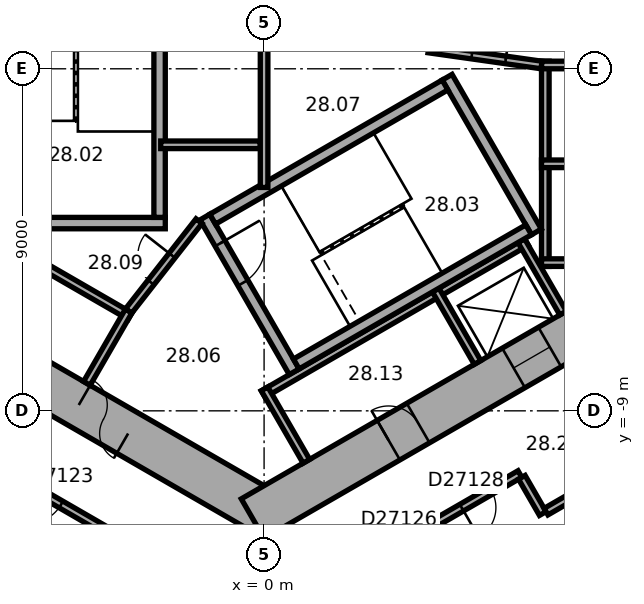
"""IFC4 building model, lengths in metres.
Left out: names, types, materials, properties, quantities, classifications, styles, units other than length and angle.
Written with IfcOpenShell. Run it as: python <this file> out.ifc"""

import sys

from ifc_helpers import new_model, si_unit, direction, frame, frame_2d, origin, place, context, subcontext, project, spatial, rectangle, extrude, element, fill, save


model = new_model("IFC4")
c1 = context("Model", 3, precision=1e-05, world=origin(), true_north=direction((0.0, 1.0)))
c2 = subcontext(c1, "Body", "Model", "MODEL_VIEW")
j1 = project(units=[si_unit("LENGTHUNIT", "METRE"), si_unit("PLANEANGLEUNIT", "RADIAN")], contexts=[c1])
p1 = place(None, origin())
s1 = spatial("IfcSite", under=j1, at=p1, CompositionType="ELEMENT")
p2 = place(p1, origin())
s2 = spatial("IfcBuilding", under=s1, at=p2, CompositionType="ELEMENT")
p3 = place(p2, frame((0.0, 0.0, 116.6)))
s3 = spatial("IfcBuildingStorey", under=s2, at=p3, CompositionType="ELEMENT", Elevation=116.6)
p4 = place(p3, frame((-10.4, -5.658, 0.0), z_axis=(0.0, 0.0, 1.0), x_axis=(0.866021384402, -0.500006961711, 0.0)))
e1 = element("IfcWall", 1, at=p4, inside=s3, PredefinedType="SHEAR", context=c2, shape_type="SweptSolid", body=[
    extrude(rectangle(XDim=12.355, YDim=1.2, at=frame_2d((6.178, 0.0))), origin(), (0.0, 0.0, 1.0), 3.3),
])
p5 = place(p4, frame((6.378, 0.0, 0.0)))
e2 = element("IfcOpeningElement", 2, at=p5, cuts=e1, PredefinedType="OPENING", context=c2, shape_type="SweptSolid", body=[
    extrude(rectangle(XDim=1.5, YDim=2.1, at=frame_2d((0.75, 1.05))), frame((0.0, 0.61, 0.0), z_axis=(0.0, -1.0, 0.0), x_axis=(1.0, 0.0, 0.0)), (0.0, 0.0, 1.0), 1.22),
])
p6 = place(p4, frame((3.228, 0.0, 0.0)))
e3 = element("IfcOpeningElement", 3, at=p6, cuts=e1, PredefinedType="OPENING", context=c2, shape_type="SweptSolid", body=[
    extrude(rectangle(XDim=0.9, YDim=2.1, at=frame_2d((0.45, 1.05))), frame((0.0, 0.61, 0.0), z_axis=(0.0, -1.0, 0.0), x_axis=(1.0, 0.0, 0.0)), (0.0, 0.0, 1.0), 1.22),
])
p7 = place(p3, frame((-0.3, -11.836, 0.0), z_axis=(0.0, 0.0, 1.0), x_axis=(0.866021384402, 0.500006961711, 0.0)))
e4 = element("IfcWall", 4, at=p7, inside=s3, PredefinedType="SHEAR", context=c2, shape_type="SweptSolid", body=[
    extrude(rectangle(XDim=12.355, YDim=1.2, at=frame_2d((6.178, 0.0))), origin(), (0.0, 0.0, 1.0), 3.3),
])
p8 = place(p7, frame((4.128, 0.0, 0.0)))
e5 = element("IfcOpeningElement", 5, at=p8, cuts=e4, PredefinedType="OPENING", context=c2, shape_type="SweptSolid", body=[
    extrude(rectangle(XDim=0.9, YDim=2.1, at=frame_2d((0.45, 1.05))), frame((0.0, 0.61, 0.0), z_axis=(0.0, -1.0, 0.0), x_axis=(1.0, 0.0, 0.0)), (0.0, 0.0, 1.0), 1.22),
])
p9 = place(p7, frame((7.928, 0.0, 0.0)))
e6 = element("IfcOpeningElement", 6, at=p9, cuts=e4, PredefinedType="OPENING", context=c2, shape_type="SweptSolid", body=[
    extrude(rectangle(XDim=1.1, YDim=2.1, at=frame_2d((0.55, 1.05))), frame((0.0, 0.61, 0.0), z_axis=(0.0, -1.0, 0.0), x_axis=(1.0, 0.0, 0.0)), (0.0, 0.0, 1.0), 1.22),
])
p10 = place(p3, frame((7.4, -5.2, 0.0), z_axis=(0.0, 0.0, 1.0), x_axis=(0.0, 1.0, 0.0)))
e7 = element("IfcWall", 7, at=p10, inside=s3, PredefinedType="PARTITIONING", context=c2, shape_type="SweptSolid", body=[
    extrude(rectangle(XDim=5.4, YDim=0.2, at=frame_2d((2.7, 0.0))), origin(), (0.0, 0.0, 1.0), 2.95),
])
for number, where, z_axis, x_axis in (
    (8, (7.3, -5.1, 0.0), (0.0, 0.0, 1.0), (1.0, 0.0, 0.0)),
    (9, (7.3, -2.5, 0.0), (0.0, 0.0, 1.0), (1.0, 0.0, 0.0)),
    (10, (7.3, 0.1, 0.0), (0.0, 0.0, 1.0), (1.0, 0.0, 0.0)),
):
    element("IfcWall", number, at=place(p3, frame(where, z_axis=z_axis, x_axis=x_axis)), inside=s3, PredefinedType="PARTITIONING", context=c2, shape_type="SweptSolid", body=[
        extrude(rectangle(XDim=2.2, YDim=0.2, at=frame_2d((1.1, 0.0))), origin(), (0.0, 0.0, 1.0), 2.95),
    ])
p11 = place(p3, frame((-8.203, -3.809, 0.0), z_axis=(0.0, 0.0, 1.0), x_axis=(0.866028230842, -0.499995103361, 0.0)))
e11 = element("IfcWall", 11, at=p11, inside=s3, PredefinedType="PARTITIONING", context=c2, shape_type="SweptSolid", body=[
    extrude(rectangle(XDim=5.4, YDim=0.2, at=frame_2d((2.7, 0.0))), origin(), (0.0, 0.0, 1.0), 2.95),
])
p12 = place(p3, frame((-3.563, -6.372, 0.0), z_axis=(0.0, 0.0, 1.0), x_axis=(-0.499994660107, -0.866028486751, 0.0)))
e12 = element("IfcWall", 12, at=p12, inside=s3, PredefinedType="PARTITIONING", context=c2, shape_type="SweptSolid", body=[
    extrude(rectangle(XDim=2.2, YDim=0.2, at=frame_2d((1.1, 0.0))), origin(), (0.0, 0.0, 1.0), 2.95),
])
p13 = place(p3, frame((-0.024, -8.559, 0.0), z_axis=(0.0, 0.0, 1.0), x_axis=(0.866026010844, 0.49999894854, 0.0)))
e13 = element("IfcWall", 13, at=p13, inside=s3, PredefinedType="PARTITIONING", context=c2, shape_type="SweptSolid", body=[
    extrude(rectangle(XDim=8.0, YDim=0.2, at=frame_2d((4.0, 0.0))), origin(), (0.0, 0.0, 1.0), 2.95),
])
for number, where, z_axis, x_axis in (
    (14, (0.013, -8.422, 0.0), (0.0, 0.0, 1.0), (0.5, -0.866, 0.0)),
    (15, (4.516, -5.822, 0.0), (0.0, 0.0, 1.0), (0.5, -0.866, 0.0)),
    (16, (6.768, -4.522, 0.0), (0.0, 0.0, 1.0), (0.5, -0.866, 0.0)),
):
    element("IfcWall", number, at=place(p3, frame(where, z_axis=z_axis, x_axis=x_axis)), inside=s3, PredefinedType="PARTITIONING", context=c2, shape_type="SweptSolid", body=[
        extrude(rectangle(XDim=2.2, YDim=0.2, at=frame_2d((1.1, 0.0))), origin(), (0.0, 0.0, 1.0), 2.95),
    ])
p14 = place(p3, frame((-2.6, -4.06, 0.0), z_axis=(0.0, 0.0, 1.0), x_axis=(-1.0, 0.0, 0.0)))
e17 = element("IfcWall", 17, at=p14, inside=s3, PredefinedType="SHEAR", context=c2, shape_type="SweptSolid", body=[
    extrude(rectangle(XDim=4.7, YDim=0.3, at=frame_2d((2.35, 0.0))), origin(), (0.0, 0.0, 1.0), 2.95),
])
p15 = place(p3, frame((-2.75, 3.15, 0.0), z_axis=(0.0, 0.0, 1.0), x_axis=(0.0, -1.0, 0.0)))
e18 = element("IfcWall", 18, at=p15, inside=s3, PredefinedType="SHEAR", context=c2, shape_type="SweptSolid", body=[
    extrude(rectangle(XDim=7.06, YDim=0.3, at=frame_2d((3.53, 0.0))), origin(), (0.0, 0.0, 1.0), 2.95),
])
p16 = place(p3, frame((-1.558, -3.902, 0.0), z_axis=(0.0, 0.0, 1.0), x_axis=(0.499977259774, -0.866038532462, 0.0)))
e19 = element("IfcWall", 19, at=p16, inside=s3, PredefinedType="SHEAR", context=c2, shape_type="SweptSolid", body=[
    extrude(rectangle(XDim=4.7, YDim=0.3, at=frame_2d((2.35, 0.0))), origin(), (0.0, 0.0, 1.0), 2.95),
])
p17 = place(p16, frame((0.8, 0.0, 0.0)))
e20 = element("IfcOpeningElement", 20, at=p17, cuts=e19, PredefinedType="OPENING", context=c2, shape_type="SweptSolid", body=[
    extrude(rectangle(XDim=1.2, YDim=2.1, at=frame_2d((0.6, 1.05))), frame((0.0, 0.16, 0.0), z_axis=(0.0, -1.0, 0.0), x_axis=(1.0, 0.0, 0.0)), (0.0, 0.0, 1.0), 0.32),
])
p18 = place(p3, frame((4.816, -0.222, 0.0), z_axis=(0.0, 0.0, 1.0), x_axis=(0.499977259774, -0.866038532462, 0.0)))
e21 = element("IfcWall", 21, at=p18, inside=s3, PredefinedType="SHEAR", context=c2, shape_type="SweptSolid", body=[
    extrude(rectangle(XDim=4.7, YDim=0.3, at=frame_2d((2.35, 0.0))), origin(), (0.0, 0.0, 1.0), 2.95),
])
for number, where, z_axis, x_axis in (
    (22, (-1.353, -3.957, 0.0), (0.0, 0.0, 1.0), (0.866, 0.5, 0.0)),
    (23, (0.847, -7.767, 0.0), (0.0, 0.0, 1.0), (0.866, 0.5, 0.0)),
):
    element("IfcWall", number, at=place(p3, frame(where, z_axis=z_axis, x_axis=x_axis)), inside=s3, PredefinedType="SHEAR", context=c2, shape_type="SweptSolid", body=[
        extrude(rectangle(XDim=7.06, YDim=0.3, at=frame_2d((3.53, 0.0))), origin(), (0.0, 0.0, 1.0), 2.95),
    ])
p19 = place(p3, frame((4.327, 0.521, 0.0), z_axis=(0.0, 0.0, 1.0), x_axis=(0.990124376366, -0.14019172346, 0.0)))
e24 = element("IfcWall", 24, at=p19, inside=s3, PredefinedType="PARTITIONING", context=c2, shape_type="SweptSolid", body=[
    extrude(rectangle(XDim=3.002, YDim=0.2, at=frame_2d((1.501, 0.0))), origin(), (0.0, 0.0, 1.0), 2.95),
])
p20 = place(p19, frame((1.15, 0.0, 0.0)))
e25 = element("IfcOpeningElement", 25, at=p20, cuts=e24, PredefinedType="OPENING", context=c2, shape_type="SweptSolid", body=[
    extrude(rectangle(XDim=0.9, YDim=2.1, at=frame_2d((0.45, 1.05))), frame((0.0, 0.11, 0.0), z_axis=(0.0, -1.0, 0.0), x_axis=(1.0, 0.0, 0.0)), (0.0, 0.0, 1.0), 0.22),
])
p21 = place(p3, frame((-1.712, -4.008, 0.0), z_axis=(0.0, 0.0, 1.0), x_axis=(-0.616549420702, -0.787316208287, 0.0)))
e26 = element("IfcWall", 26, at=p21, inside=s3, PredefinedType="PARTITIONING", context=c2, shape_type="SweptSolid", body=[
    extrude(rectangle(XDim=3.002, YDim=0.2, at=frame_2d((1.501, 0.0))), origin(), (0.0, 0.0, 1.0), 2.95),
])
p22 = place(p21, frame((1.15, 0.0, 0.0)))
e27 = element("IfcOpeningElement", 27, at=p22, cuts=e26, PredefinedType="OPENING", context=c2, shape_type="SweptSolid", body=[
    extrude(rectangle(XDim=0.9, YDim=2.1, at=frame_2d((0.45, 1.05))), frame((0.0, 0.11, 0.0), z_axis=(0.0, -1.0, 0.0), x_axis=(1.0, 0.0, 0.0)), (0.0, 0.0, 1.0), 0.22),
])
p23 = place(p3, frame((-2.72, -2.0, 0.0), z_axis=(0.0, 0.0, 1.0), x_axis=(1.0, 0.0, 0.0)))
e28 = element("IfcWall", 28, at=p23, inside=s3, PredefinedType="PARTITIONING", context=c2, shape_type="SweptSolid", body=[
    extrude(rectangle(XDim=2.62, YDim=0.2, at=frame_2d((1.31, 0.0))), origin(), (0.0, 0.0, 1.0), 2.95),
])
p24 = place(p3, frame((0.0, -3.122, 0.0), z_axis=(0.0, 0.0, 1.0), x_axis=(0.0, 1.0, 0.0)))
e29 = element("IfcWall", 29, at=p24, inside=s3, PredefinedType="PARTITIONING", context=c2, shape_type="SweptSolid", body=[
    extrude(rectangle(XDim=6.245, YDim=0.2, at=frame_2d((3.122, 0.0))), origin(), (0.0, 0.0, 1.0), 2.95),
])
p25 = place(p3, frame((-11.615, -7.843, 0.0), z_axis=(0.0, 0.0, 1.0), x_axis=(0.866026466995, -0.499998158461, 0.0)))
e30 = element("IfcWall", 30, at=p25, inside=s3, PredefinedType="PARTITIONING", context=c2, shape_type="SweptSolid", body=[
    extrude(rectangle(XDim=12.315, YDim=0.2, at=frame_2d((6.158, 0.0))), origin(), (0.0, 0.0, 1.0), 2.95),
])
p26 = place(p25, frame((6.244, 0.0, 0.0)))
e31 = element("IfcOpeningElement", 31, at=p26, cuts=e30, PredefinedType="OPENING", context=c2, shape_type="SweptSolid", body=[
    extrude(rectangle(XDim=1.0, YDim=2.1, at=frame_2d((0.5, 1.05))), frame((0.0, 0.11, 0.0), z_axis=(0.0, -1.0, 0.0), x_axis=(1.0, 0.0, 0.0)), (0.0, 0.0, 1.0), 0.22),
])
p27 = place(p3, frame((1.033, -13.953, 0.0), z_axis=(0.0, 0.0, 1.0), x_axis=(0.866017531406, 0.500013635111, 0.0)))
e32 = element("IfcWall", 32, at=p27, inside=s3, PredefinedType="PARTITIONING", context=c2, shape_type="SweptSolid", body=[
    extrude(rectangle(XDim=6.58, YDim=0.2, at=frame_2d((3.29, 0.0))), origin(), (0.0, 0.0, 1.0), 2.95),
])
p28 = place(p27, frame((2.767, 0.0, 0.0)))
e33 = element("IfcOpeningElement", 33, at=p28, cuts=e32, PredefinedType="OPENING", context=c2, shape_type="SweptSolid", body=[
    extrude(rectangle(XDim=0.9, YDim=2.1, at=frame_2d((0.45, 1.05))), frame((0.0, 0.11, 0.0), z_axis=(0.0, -1.0, 0.0), x_axis=(1.0, 0.0, 0.0)), (0.0, 0.0, 1.0), 0.22),
])
p29 = place(p27, frame((4.811, 0.0, 0.0)))
e34 = element("IfcOpeningElement", 34, at=p29, cuts=e32, PredefinedType="OPENING", context=c2, shape_type="SweptSolid", body=[
    extrude(rectangle(XDim=0.9, YDim=2.1, at=frame_2d((0.45, 1.05))), frame((0.0, 0.11, 0.0), z_axis=(0.0, -1.0, 0.0), x_axis=(1.0, 0.0, 0.0)), (0.0, 0.0, 1.0), 0.22),
])
p30 = place(p3, frame((6.782, -10.749, 0.0), z_axis=(0.0, 0.0, 1.0), x_axis=(0.500074377092, -0.865982457891, 0.0)))
e35 = element("IfcWall", 35, at=p30, inside=s3, PredefinedType="PARTITIONING", context=c2, shape_type="SweptSolid", body=[
    extrude(rectangle(XDim=1.101, YDim=0.2, at=frame_2d((0.55, 0.0))), origin(), (0.0, 0.0, 1.0), 2.95),
])
p31 = place(p3, frame((7.419, -11.653, 0.0), z_axis=(0.0, 0.0, 1.0), x_axis=(0.866038154057, 0.49997791523, 0.0)))
e36 = element("IfcWall", 36, at=p31, inside=s3, PredefinedType="PARTITIONING", context=c2, shape_type="SweptSolid", body=[
    extrude(rectangle(XDim=3.502, YDim=0.2, at=frame_2d((1.751, 0.0))), origin(), (0.0, 0.0, 1.0), 2.95),
])
p32 = place(p5, origin())
e37 = element("IfcDoor", 37, at=p32, inside=s3, OperationType="DOUBLE_DOOR_SINGLE_SWING", PredefinedType="DOOR", context=c2, shape_type="SweptSolid", body=[
    extrude(rectangle(XDim=1.5, YDim=2.1, at=frame_2d((0.75, 1.05))), frame((0.0, 0.025, 0.0), z_axis=(0.0, -1.0, 0.0), x_axis=(1.0, 0.0, 0.0)), (0.0, 0.0, 1.0), 0.05),
])
fill(e2, e37)
p33 = place(p17, origin())
e38 = element("IfcDoor", 38, at=p33, inside=s3, OperationType="SINGLE_SWING_RIGHT", PredefinedType="DOOR", context=c2, shape_type="SweptSolid", body=[
    extrude(rectangle(XDim=1.2, YDim=2.1, at=frame_2d((0.6, 1.05))), frame((0.0, 0.025, 0.0), z_axis=(0.0, -1.0, 0.0), x_axis=(1.0, 0.0, 0.0)), (0.0, 0.0, 1.0), 0.05),
])
fill(e20, e38)
p34 = place(p20, origin())
e39 = element("IfcDoor", 39, at=p34, inside=s3, OperationType="SINGLE_SWING_LEFT", PredefinedType="DOOR", context=c2, shape_type="SweptSolid", body=[
    extrude(rectangle(XDim=0.9, YDim=2.1, at=frame_2d((0.45, 1.05))), frame((0.0, 0.025, 0.0), z_axis=(0.0, -1.0, 0.0), x_axis=(1.0, 0.0, 0.0)), (0.0, 0.0, 1.0), 0.05),
])
fill(e25, e39)
p35 = place(p22, origin())
e40 = element("IfcDoor", 40, at=p35, inside=s3, OperationType="SINGLE_SWING_LEFT", PredefinedType="DOOR", context=c2, shape_type="SweptSolid", body=[
    extrude(rectangle(XDim=0.9, YDim=2.1, at=frame_2d((0.45, 1.05))), frame((0.0, 0.025, 0.0), z_axis=(0.0, -1.0, 0.0), x_axis=(1.0, 0.0, 0.0)), (0.0, 0.0, 1.0), 0.05),
])
fill(e27, e40)
p36 = place(p8, origin())
e41 = element("IfcDoor", 41, at=p36, inside=s3, OperationType="SINGLE_SWING_LEFT", PredefinedType="DOOR", context=c2, shape_type="SweptSolid", body=[
    extrude(rectangle(XDim=0.9, YDim=2.1, at=frame_2d((0.45, 1.05))), frame((0.0, 0.025, 0.0), z_axis=(0.0, -1.0, 0.0), x_axis=(1.0, 0.0, 0.0)), (0.0, 0.0, 1.0), 0.05),
])
fill(e5, e41)
p37 = place(p9, origin())
e42 = element("IfcDoor", 42, at=p37, inside=s3, OperationType="DOUBLE_DOOR_SLIDING", PredefinedType="DOOR", context=c2, shape_type="SweptSolid", body=[
    extrude(rectangle(XDim=1.1, YDim=2.1, at=frame_2d((0.55, 1.05))), frame((0.0, 0.025, 0.0), z_axis=(0.0, -1.0, 0.0), x_axis=(1.0, 0.0, 0.0)), (0.0, 0.0, 1.0), 0.05),
])
fill(e6, e42)
p38 = place(p26, origin())
e43 = element("IfcDoor", 43, at=p38, inside=s3, OperationType="SINGLE_SWING_LEFT", PredefinedType="DOOR", context=c2, shape_type="SweptSolid", body=[
    extrude(rectangle(XDim=1.0, YDim=2.1, at=frame_2d((0.5, 1.05))), frame((0.0, 0.025, 0.0), z_axis=(0.0, -1.0, 0.0), x_axis=(1.0, 0.0, 0.0)), (0.0, 0.0, 1.0), 0.05),
])
fill(e31, e43)
p39 = place(p29, origin())
e44 = element("IfcDoor", 44, at=p39, inside=s3, OperationType="SINGLE_SWING_LEFT", PredefinedType="DOOR", context=c2, shape_type="SweptSolid", body=[
    extrude(rectangle(XDim=0.9, YDim=2.1, at=frame_2d((0.45, 1.05))), frame((0.0, 0.025, 0.0), z_axis=(0.0, -1.0, 0.0), x_axis=(1.0, 0.0, 0.0)), (0.0, 0.0, 1.0), 0.05),
])
fill(e34, e44)
save(model, sys.argv[1])
